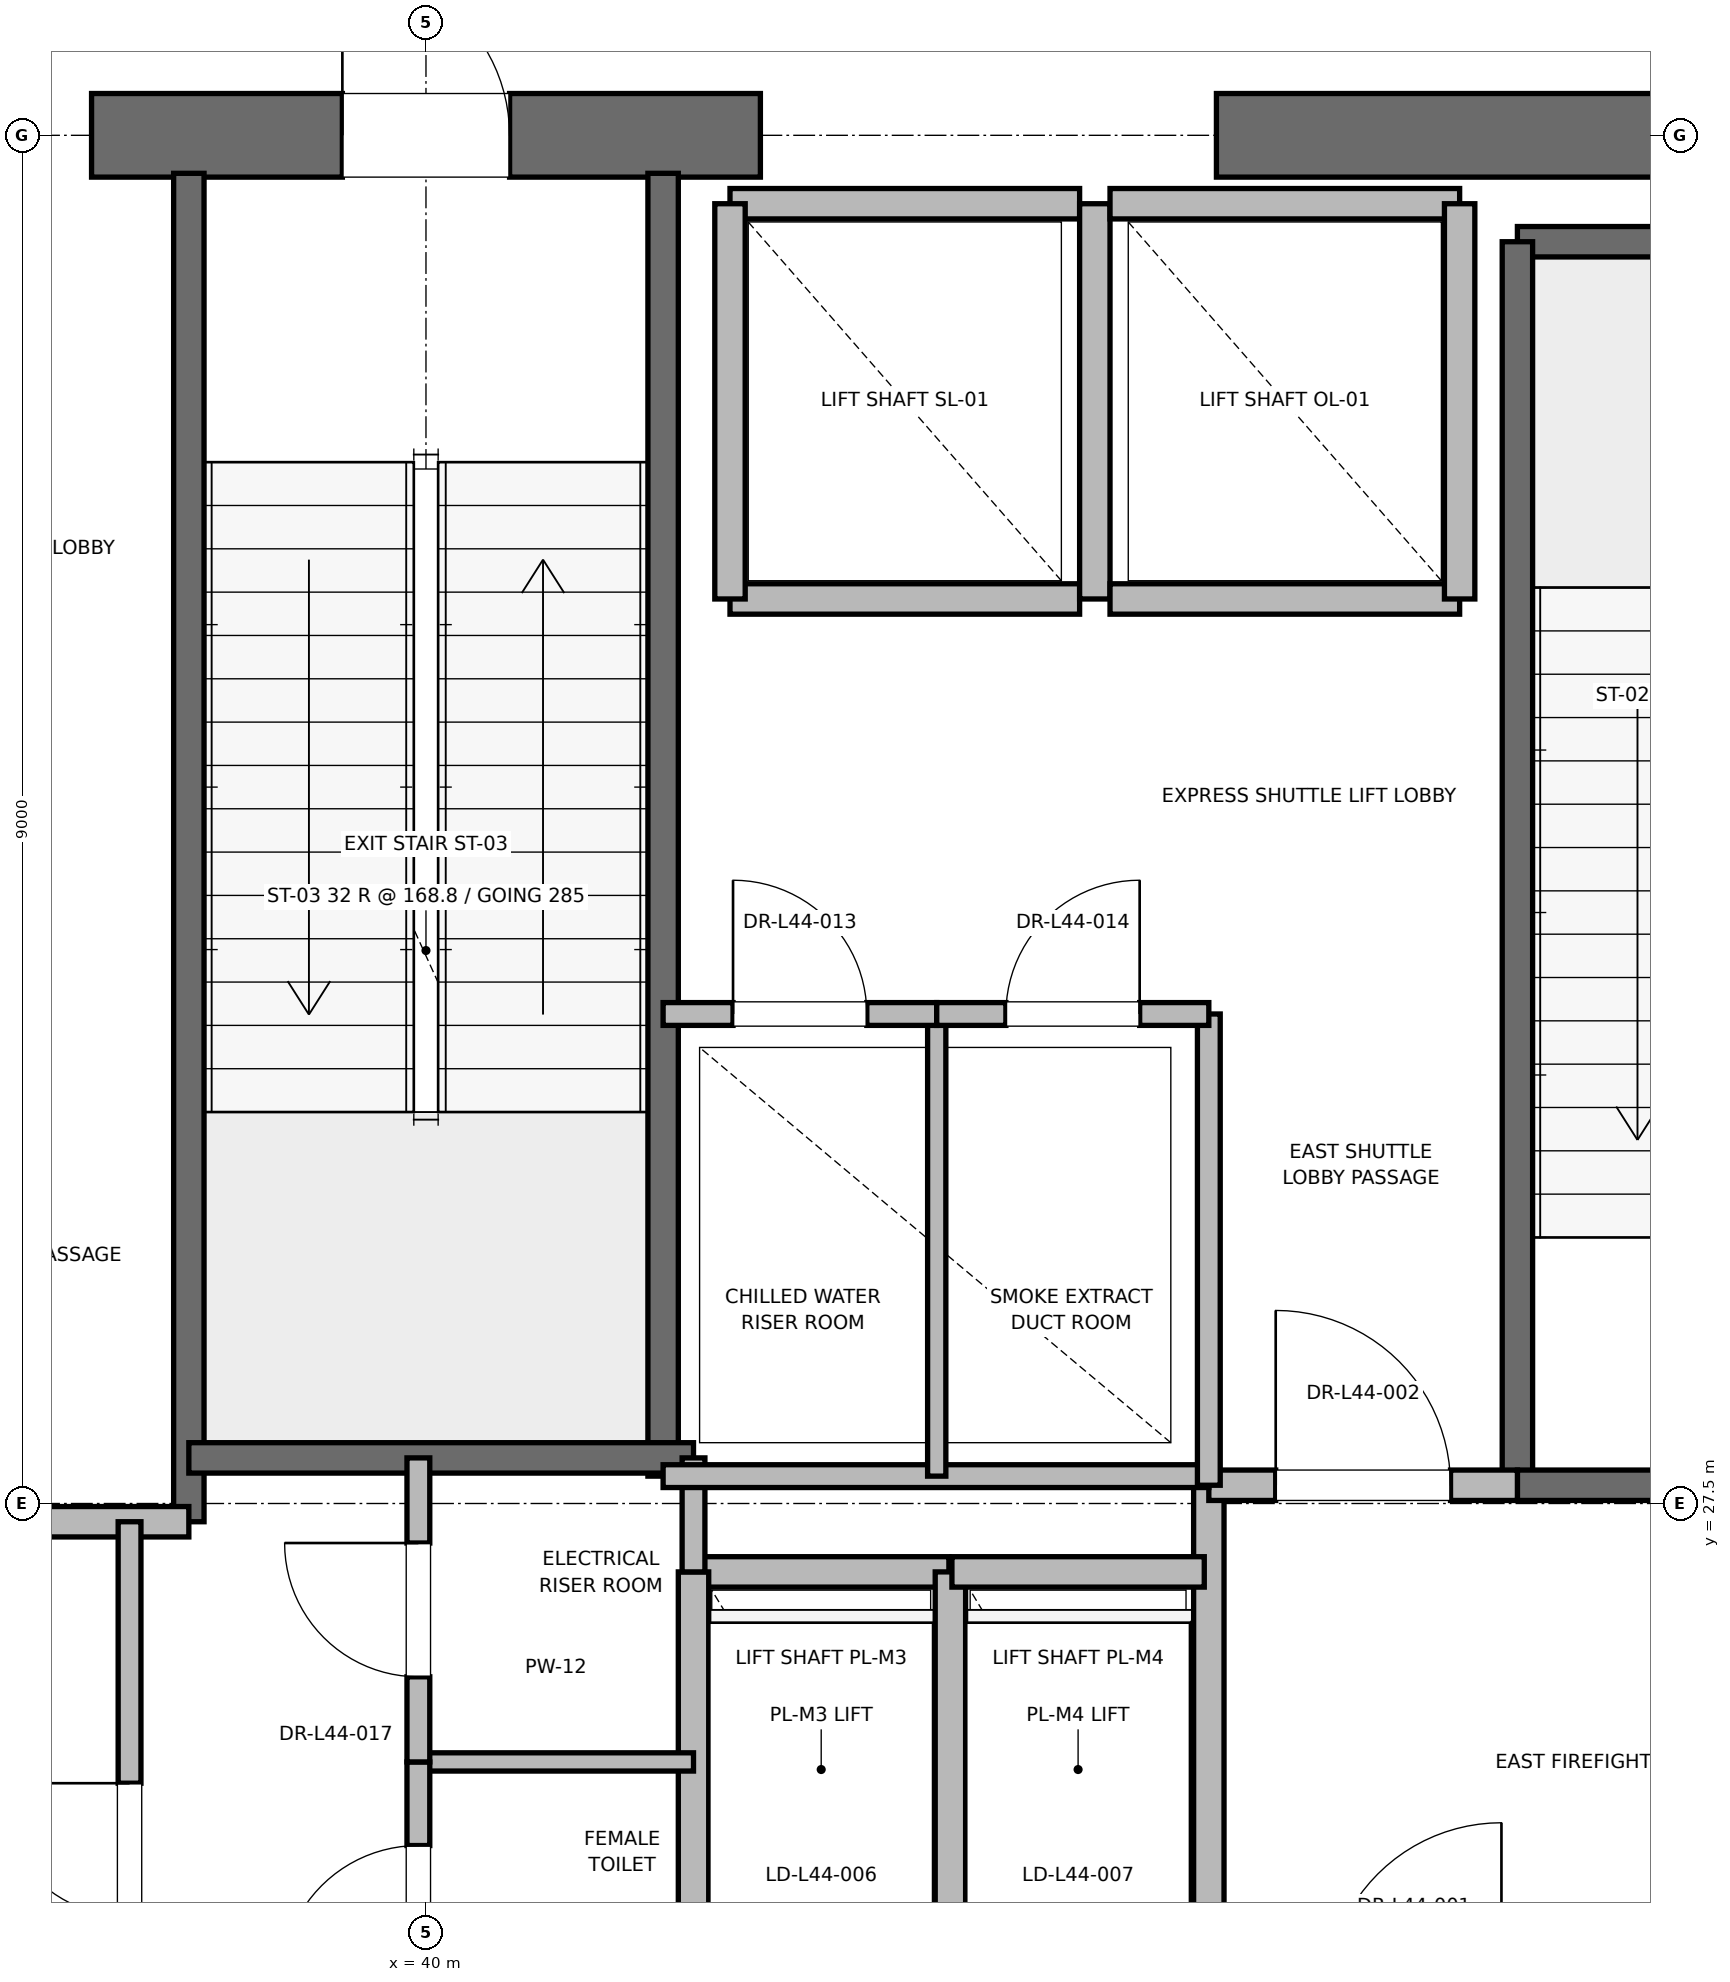
"""IFC4 building model, lengths in metres.
Left out: names, types, materials, properties, quantities, classifications, styles, units other than length and angle.
Written with IfcOpenShell. Run it as: python <this file> out.ifc"""

import sys

from ifc_helpers import new_model, si_unit, direction, frame, frame_2d, origin, place, context, subcontext, project, spatial, rectangle, extrude, element, fill, save


model = new_model("IFC4")
c1 = context("Model", 3, precision=1e-05, world=origin(), true_north=direction((0.0, 1.0)))
c2 = subcontext(c1, "Body", "Model", "MODEL_VIEW")
j1 = project(units=[si_unit("LENGTHUNIT", "METRE"), si_unit("PLANEANGLEUNIT", "RADIAN")], contexts=[c1])
p1 = place(None, origin())
s1 = spatial("IfcSite", under=j1, at=p1, CompositionType="ELEMENT")
p2 = place(p1, origin())
s2 = spatial("IfcBuilding", under=s1, at=p2, CompositionType="ELEMENT")
p3 = place(p2, frame((0.0, 0.0, 189.4)))
s3 = spatial("IfcBuildingStorey", under=s2, at=p3, CompositionType="ELEMENT", Elevation=189.4)
p4 = place(p3, frame((37.8, 36.5, 0.0), z_axis=(0.0, 0.0, 1.0), x_axis=(1.0, 0.0, 0.0)))
e1 = element("IfcWall", 1, at=p4, inside=s3, PredefinedType="SHEAR", context=c2, shape_type="SweptSolid", body=[
    extrude(rectangle(XDim=4.4, YDim=0.55, at=frame_2d((2.2, 0.0))), origin(), (0.0, 0.0, 1.0), 5.1),
])
p5 = place(p4, frame((1.65, 0.0, 0.0)))
e2 = element("IfcOpeningElement", 2, at=p5, cuts=e1, PredefinedType="OPENING", context=c2, shape_type="SweptSolid", body=[
    extrude(rectangle(XDim=1.1, YDim=2.15, at=frame_2d((0.55, 1.075))), frame((0.0, 0.275, 0.0), z_axis=(0.0, -1.0, 0.0), x_axis=(1.0, 0.0, 0.0)), (0.0, 0.0, 1.0), 0.55),
])
p6 = place(p3, frame((45.2, 36.5, 0.0), z_axis=(0.0, 0.0, 1.0), x_axis=(1.0, 0.0, 0.0)))
e3 = element("IfcWall", 3, at=p6, inside=s3, PredefinedType="SHEAR", context=c2, shape_type="SweptSolid", body=[
    extrude(rectangle(XDim=5.8, YDim=0.55, at=frame_2d((2.9, 0.0))), origin(), (0.0, 0.0, 1.0), 5.1),
])
p7 = place(p3, frame((47.18, 35.8, 0.0), z_axis=(0.0, 0.0, 1.0), x_axis=(1.0, 0.0, 0.0)))
e4 = element("IfcWall", 4, at=p7, inside=s3, PredefinedType="SOLIDWALL", context=c2, shape_type="SweptSolid", body=[
    extrude(rectangle(XDim=3.12, YDim=0.2, at=frame_2d((1.56, 0.0))), origin(), (0.0, 0.0, 1.0), 5.1),
])
p8 = place(p3, frame((47.18, 27.62, 0.0), z_axis=(0.0, 0.0, 1.0), x_axis=(0.0, 1.0, 0.0)))
e5 = element("IfcWall", 5, at=p8, inside=s3, PredefinedType="SOLIDWALL", context=c2, shape_type="SweptSolid", body=[
    extrude(rectangle(XDim=8.18, YDim=0.2, at=frame_2d((4.09, 0.0))), origin(), (0.0, 0.0, 1.0), 5.1),
])
p9 = place(p3, frame((47.18, 27.62, 0.0), z_axis=(0.0, 0.0, 1.0), x_axis=(1.0, 0.0, 0.0)))
e6 = element("IfcWall", 6, at=p9, inside=s3, PredefinedType="SOLIDWALL", context=c2, shape_type="SweptSolid", body=[
    extrude(rectangle(XDim=3.12, YDim=0.2, at=frame_2d((1.56, 0.0))), origin(), (0.0, 0.0, 1.0), 5.1),
])
p10 = place(p9, frame((1.01, 0.0, 0.0)))
e7 = element("IfcOpeningElement", 7, at=p10, cuts=e6, PredefinedType="OPENING", context=c2, shape_type="SweptSolid", body=[
    extrude(rectangle(XDim=1.1, YDim=2.15, at=frame_2d((0.55, 1.075))), frame((0.0, 0.1, 0.0), z_axis=(0.0, -1.0, 0.0), x_axis=(1.0, 0.0, 0.0)), (0.0, 0.0, 1.0), 0.2),
])
p11 = place(p3, frame((38.44, 27.38, 0.0), z_axis=(0.0, 0.0, 1.0), x_axis=(0.0, 1.0, 0.0)))
e8 = element("IfcWall", 8, at=p11, inside=s3, PredefinedType="SOLIDWALL", context=c2, shape_type="SweptSolid", body=[
    extrude(rectangle(XDim=8.87, YDim=0.2, at=frame_2d((4.435, 0.0))), origin(), (0.0, 0.0, 1.0), 5.1),
])
p12 = place(p3, frame((41.56, 27.68, 0.0), z_axis=(0.0, 0.0, 1.0), x_axis=(0.0, 1.0, 0.0)))
e9 = element("IfcWall", 9, at=p12, inside=s3, PredefinedType="SOLIDWALL", context=c2, shape_type="SweptSolid", body=[
    extrude(rectangle(XDim=8.57, YDim=0.2, at=frame_2d((4.285, 0.0))), origin(), (0.0, 0.0, 1.0), 5.1),
])
p13 = place(p3, frame((38.44, 27.8, 0.0), z_axis=(0.0, 0.0, 1.0), x_axis=(1.0, 0.0, 0.0)))
e10 = element("IfcWall", 10, at=p13, inside=s3, PredefinedType="SOLIDWALL", context=c2, shape_type="SweptSolid", body=[
    extrude(rectangle(XDim=3.32, YDim=0.2, at=frame_2d((1.66, 0.0))), origin(), (0.0, 0.0, 1.0), 5.1),
])
p14 = place(p3, frame((32.82, 27.38, 0.0), z_axis=(0.0, 0.0, 1.0), x_axis=(1.0, 0.0, 0.0)))
e11 = element("IfcWall", 11, at=p14, inside=s3, PredefinedType="PARTITIONING", context=c2, shape_type="SweptSolid", body=[
    extrude(rectangle(XDim=5.62, YDim=0.2, at=frame_2d((2.81, 0.0))), origin(), (0.0, 0.0, 1.0), 5.1),
])
p15 = place(p3, frame((45.15, 24.25, 0.0), z_axis=(0.0, 0.0, 1.0), x_axis=(0.0, 1.0, 0.0)))
e12 = element("IfcWall", 12, at=p15, inside=s3, PredefinedType="PARTITIONING", context=c2, shape_type="SweptSolid", body=[
    extrude(rectangle(XDim=3.37, YDim=0.2, at=frame_2d((1.685, 0.0))), origin(), (0.0, 0.0, 1.0), 5.1),
])
p16 = place(p3, frame((45.15, 27.62, 0.0), z_axis=(0.0, 0.0, 1.0), x_axis=(1.0, 0.0, 0.0)))
e13 = element("IfcWall", 13, at=p16, inside=s3, PredefinedType="PARTITIONING", context=c2, shape_type="SweptSolid", body=[
    extrude(rectangle(XDim=2.03, YDim=0.2, at=frame_2d((1.015, 0.0))), origin(), (0.0, 0.0, 1.0), 5.1),
])
p17 = place(p16, frame((0.44, 0.0, 0.0)))
e14 = element("IfcOpeningElement", 14, at=p17, cuts=e13, PredefinedType="OPENING", context=c2, shape_type="SweptSolid", body=[
    extrude(rectangle(XDim=1.15, YDim=2.2, at=frame_2d((0.575, 1.1))), frame((0.0, 0.1, 0.0), z_axis=(0.0, -1.0, 0.0), x_axis=(1.0, 0.0, 0.0)), (0.0, 0.0, 1.0), 0.2),
])
p18 = place(p3, frame((43.44, 27.05, 0.0), z_axis=(0.0, 0.0, 1.0), x_axis=(-1.0, 0.0, 0.0)))
e15 = element("IfcWall", 15, at=p18, inside=s3, PredefinedType="SOLIDWALL", context=c2, shape_type="SweptSolid", body=[
    extrude(rectangle(XDim=1.68, YDim=0.2, at=frame_2d((0.84, 0.0))), origin(), (0.0, 0.0, 1.0), 5.1),
])
for number, where, z_axis, x_axis in (
    (16, (41.76, 27.05, 0.0), (0.0, 0.0, 1.0), (0.0, -1.0, 0.0)),
    (17, (43.45, 24.45, 0.0), (0.0, 0.0, 1.0), (0.0, 1.0, 0.0)),
):
    element("IfcWall", number, at=place(p3, frame(where, z_axis=z_axis, x_axis=x_axis)), inside=s3, PredefinedType="SOLIDWALL", context=c2, shape_type="SweptSolid", body=[
        extrude(rectangle(XDim=2.6, YDim=0.2, at=frame_2d((1.3, 0.0))), origin(), (0.0, 0.0, 1.0), 5.1),
    ])
p19 = place(p3, frame((45.12, 27.05, 0.0), z_axis=(0.0, 0.0, 1.0), x_axis=(-1.0, 0.0, 0.0)))
e18 = element("IfcWall", 18, at=p19, inside=s3, PredefinedType="SOLIDWALL", context=c2, shape_type="SweptSolid", body=[
    extrude(rectangle(XDim=1.66, YDim=0.2, at=frame_2d((0.83, 0.0))), origin(), (0.0, 0.0, 1.0), 5.1),
])
p20 = place(p3, frame((42.0, 33.45, 0.0), z_axis=(0.0, 0.0, 1.0), x_axis=(1.0, 0.0, 0.0)))
e19 = element("IfcWall", 19, at=p20, inside=s3, PredefinedType="SOLIDWALL", context=c2, shape_type="SweptSolid", body=[
    extrude(rectangle(XDim=2.3, YDim=0.2, at=frame_2d((1.15, 0.0))), origin(), (0.0, 0.0, 1.0), 5.1),
])
p21 = place(p3, frame((44.3, 36.05, 0.0), z_axis=(0.0, 0.0, 1.0), x_axis=(-1.0, 0.0, 0.0)))
e20 = element("IfcWall", 20, at=p21, inside=s3, PredefinedType="SOLIDWALL", context=c2, shape_type="SweptSolid", body=[
    extrude(rectangle(XDim=2.3, YDim=0.2, at=frame_2d((1.15, 0.0))), origin(), (0.0, 0.0, 1.0), 4.08),
])
for number, where, z_axis, x_axis in (
    (21, (42.0, 36.05, 0.0), (0.0, 0.0, 1.0), (0.0, -1.0, 0.0)),
    (22, (44.4, 33.45, 0.0), (0.0, 0.0, 1.0), (0.0, 1.0, 0.0)),
):
    element("IfcWall", number, at=place(p3, frame(where, z_axis=z_axis, x_axis=x_axis)), inside=s3, PredefinedType="SOLIDWALL", context=c2, shape_type="SweptSolid", body=[
        extrude(rectangle(XDim=2.6, YDim=0.2, at=frame_2d((1.3, 0.0))), origin(), (0.0, 0.0, 1.0), 4.08),
    ])
p22 = place(p3, frame((44.5, 33.45, 0.0), z_axis=(0.0, 0.0, 1.0), x_axis=(1.0, 0.0, 0.0)))
e23 = element("IfcWall", 23, at=p22, inside=s3, PredefinedType="SOLIDWALL", context=c2, shape_type="SweptSolid", body=[
    extrude(rectangle(XDim=2.3, YDim=0.2, at=frame_2d((1.15, 0.0))), origin(), (0.0, 0.0, 1.0), 5.1),
])
p23 = place(p3, frame((46.8, 36.05, 0.0), z_axis=(0.0, 0.0, 1.0), x_axis=(-1.0, 0.0, 0.0)))
e24 = element("IfcWall", 24, at=p23, inside=s3, PredefinedType="SOLIDWALL", context=c2, shape_type="SweptSolid", body=[
    extrude(rectangle(XDim=2.3, YDim=0.2, at=frame_2d((1.15, 0.0))), origin(), (0.0, 0.0, 1.0), 4.08),
])
p24 = place(p3, frame((46.8, 33.45, 0.0), z_axis=(0.0, 0.0, 1.0), x_axis=(0.0, 1.0, 0.0)))
e25 = element("IfcWall", 25, at=p24, inside=s3, PredefinedType="SOLIDWALL", context=c2, shape_type="SweptSolid", body=[
    extrude(rectangle(XDim=2.6, YDim=0.2, at=frame_2d((1.3, 0.0))), origin(), (0.0, 0.0, 1.0), 5.1),
])
p25 = place(p3, frame((39.95, 25.8, 0.0), z_axis=(0.0, 0.0, 1.0), x_axis=(1.0, 0.0, 0.0)))
e26 = element("IfcWall", 26, at=p25, inside=s3, PredefinedType="PARTITIONING", context=c2, shape_type="SweptSolid", body=[
    extrude(rectangle(XDim=1.81, YDim=0.12, at=frame_2d((0.905, 0.0))), origin(), (0.0, 0.0, 1.0), 2.85),
])
p26 = place(p3, frame((41.76, 27.05, 0.0), z_axis=(0.0, 0.0, 1.0), x_axis=(0.0, 1.0, 0.0)))
e27 = element("IfcWall", 27, at=p26, inside=s3, PredefinedType="PARTITIONING", context=c2, shape_type="SweptSolid", body=[
    extrude(rectangle(XDim=0.75, YDim=0.15, at=frame_2d((0.375, 0.0))), origin(), (0.0, 0.0, 1.0), 2.85),
])
p27 = place(p3, frame((39.95, 23.8, 0.0), z_axis=(0.0, 0.0, 1.0), x_axis=(0.0, 1.0, 0.0)))
e28 = element("IfcWall", 28, at=p27, inside=s3, PredefinedType="PARTITIONING", context=c2, shape_type="SweptSolid", body=[
    extrude(rectangle(XDim=2.0, YDim=0.15, at=frame_2d((1.0, 0.0))), origin(), (0.0, 0.0, 1.0), 2.85),
])
p28 = place(p27, frame((0.55, 0.0, 0.0)))
e29 = element("IfcOpeningElement", 29, at=p28, cuts=e28, PredefinedType="OPENING", context=c2, shape_type="SweptSolid", body=[
    extrude(rectangle(XDim=0.9, YDim=2.1, at=frame_2d((0.45, 1.05))), frame((0.0, 0.075, 0.0), z_axis=(0.0, -1.0, 0.0), x_axis=(1.0, 0.0, 0.0)), (0.0, 0.0, 1.0), 0.15),
])
p29 = place(p3, frame((39.95, 25.8, 0.0), z_axis=(0.0, 0.0, 1.0), x_axis=(0.0, 1.0, 0.0)))
e30 = element("IfcWall", 30, at=p29, inside=s3, PredefinedType="PARTITIONING", context=c2, shape_type="SweptSolid", body=[
    extrude(rectangle(XDim=2.0, YDim=0.15, at=frame_2d((1.0, 0.0))), origin(), (0.0, 0.0, 1.0), 2.85),
])
p30 = place(p29, frame((0.56, 0.0, 0.0)))
e31 = element("IfcOpeningElement", 31, at=p30, cuts=e30, PredefinedType="OPENING", context=c2, shape_type="SweptSolid", body=[
    extrude(rectangle(XDim=0.88, YDim=2.1, at=frame_2d((0.44, 1.05))), frame((0.0, 0.075, 0.0), z_axis=(0.0, -1.0, 0.0), x_axis=(1.0, 0.0, 0.0)), (0.0, 0.0, 1.0), 0.15),
])
p31 = place(p3, frame((38.05, 23.06, 0.0), z_axis=(0.0, 0.0, 1.0), x_axis=(0.0, 1.0, 0.0)))
e32 = element("IfcWall", 32, at=p31, inside=s3, PredefinedType="PARTITIONING", context=c2, shape_type="SweptSolid", body=[
    extrude(rectangle(XDim=4.32, YDim=0.15, at=frame_2d((2.16, 0.0))), origin(), (0.0, 0.0, 1.0), 2.85),
])
p32 = place(p31, frame((1.72, 0.0, 0.0)))
e33 = element("IfcOpeningElement", 33, at=p32, cuts=e32, PredefinedType="OPENING", context=c2, shape_type="SweptSolid", body=[
    extrude(rectangle(XDim=0.88, YDim=2.1, at=frame_2d((0.44, 1.05))), frame((0.0, 0.075, 0.0), z_axis=(0.0, -1.0, 0.0), x_axis=(1.0, 0.0, 0.0)), (0.0, 0.0, 1.0), 0.15),
])
p33 = place(p3, frame((41.56, 27.68, 0.0), z_axis=(0.0, 0.0, 1.0), x_axis=(1.0, 0.0, 0.0)))
e34 = element("IfcWall", 34, at=p33, inside=s3, PredefinedType="PARTITIONING", context=c2, shape_type="SweptSolid", body=[
    extrude(rectangle(XDim=3.59, YDim=0.15, at=frame_2d((1.795, 0.0))), origin(), (0.0, 0.0, 1.0), 2.85),
])
p34 = place(p3, frame((45.15, 27.62, 0.0), z_axis=(0.0, 0.0, 1.0), x_axis=(0.0, 1.0, 0.0)))
e35 = element("IfcWall", 35, at=p34, inside=s3, PredefinedType="PARTITIONING", context=c2, shape_type="SweptSolid", body=[
    extrude(rectangle(XDim=3.1, YDim=0.15, at=frame_2d((1.55, 0.0))), origin(), (0.0, 0.0, 1.0), 2.85),
])
p35 = place(p3, frame((43.36, 27.68, 0.0), z_axis=(0.0, 0.0, 1.0), x_axis=(0.0, 1.0, 0.0)))
e36 = element("IfcWall", 36, at=p35, inside=s3, PredefinedType="PARTITIONING", context=c2, shape_type="SweptSolid", body=[
    extrude(rectangle(XDim=3.04, YDim=0.12, at=frame_2d((1.52, 0.0))), origin(), (0.0, 0.0, 1.0), 2.85),
])
p36 = place(p3, frame((41.56, 30.72, 0.0), z_axis=(0.0, 0.0, 1.0), x_axis=(1.0, 0.0, 0.0)))
e37 = element("IfcWall", 37, at=p36, inside=s3, PredefinedType="PARTITIONING", context=c2, shape_type="SweptSolid", body=[
    extrude(rectangle(XDim=1.8, YDim=0.15, at=frame_2d((0.9, 0.0))), origin(), (0.0, 0.0, 1.0), 2.85),
])
p37 = place(p36, frame((0.46, 0.0, 0.0)))
e38 = element("IfcOpeningElement", 38, at=p37, cuts=e37, PredefinedType="OPENING", context=c2, shape_type="SweptSolid", body=[
    extrude(rectangle(XDim=0.88, YDim=2.1, at=frame_2d((0.44, 1.05))), frame((0.0, 0.075, 0.0), z_axis=(0.0, -1.0, 0.0), x_axis=(1.0, 0.0, 0.0)), (0.0, 0.0, 1.0), 0.15),
])
p38 = place(p3, frame((43.36, 30.72, 0.0), z_axis=(0.0, 0.0, 1.0), x_axis=(1.0, 0.0, 0.0)))
e39 = element("IfcWall", 39, at=p38, inside=s3, PredefinedType="PARTITIONING", context=c2, shape_type="SweptSolid", body=[
    extrude(rectangle(XDim=1.79, YDim=0.15, at=frame_2d((0.895, 0.0))), origin(), (0.0, 0.0, 1.0), 2.85),
])
p39 = place(p38, frame((0.455, 0.0, 0.0)))
e40 = element("IfcOpeningElement", 40, at=p39, cuts=e39, PredefinedType="OPENING", context=c2, shape_type="SweptSolid", body=[
    extrude(rectangle(XDim=0.88, YDim=2.1, at=frame_2d((0.44, 1.05))), frame((0.0, 0.075, 0.0), z_axis=(0.0, -1.0, 0.0), x_axis=(1.0, 0.0, 0.0)), (0.0, 0.0, 1.0), 0.15),
])
p40 = place(p5, origin())
e41 = element("IfcDoor", 41, at=p40, inside=s3, OperationType="SINGLE_SWING_LEFT", PredefinedType="DOOR", context=c2, shape_type="SweptSolid", body=[
    extrude(rectangle(XDim=1.1, YDim=2.15, at=frame_2d((0.55, 1.075))), frame((0.0, 0.025, 0.0), z_axis=(0.0, -1.0, 0.0), x_axis=(1.0, 0.0, 0.0)), (0.0, 0.0, 1.0), 0.05),
])
fill(e2, e41)
p41 = place(p17, origin())
e42 = element("IfcDoor", 42, at=p41, inside=s3, OperationType="SINGLE_SWING_LEFT", PredefinedType="DOOR", context=c2, shape_type="SweptSolid", body=[
    extrude(rectangle(XDim=1.15, YDim=2.2, at=frame_2d((0.575, 1.1))), frame((0.0, 0.025, 0.0), z_axis=(0.0, -1.0, 0.0), x_axis=(1.0, 0.0, 0.0)), (0.0, 0.0, 1.0), 0.05),
])
fill(e14, e42)
p42 = place(p28, origin())
e43 = element("IfcDoor", 43, at=p42, inside=s3, OperationType="SINGLE_SWING_LEFT", PredefinedType="DOOR", context=c2, shape_type="SweptSolid", body=[
    extrude(rectangle(XDim=0.9, YDim=2.1, at=frame_2d((0.45, 1.05))), frame((0.0, 0.025, 0.0), z_axis=(0.0, -1.0, 0.0), x_axis=(1.0, 0.0, 0.0)), (0.0, 0.0, 1.0), 0.05),
])
fill(e29, e43)
p43 = place(p30, origin())
e44 = element("IfcDoor", 44, at=p43, inside=s3, OperationType="SINGLE_SWING_RIGHT", PredefinedType="DOOR", context=c2, shape_type="SweptSolid", body=[
    extrude(rectangle(XDim=0.88, YDim=2.1, at=frame_2d((0.44, 1.05))), frame((0.0, 0.025, 0.0), z_axis=(0.0, -1.0, 0.0), x_axis=(1.0, 0.0, 0.0)), (0.0, 0.0, 1.0), 0.05),
])
fill(e31, e44)
p44 = place(p32, origin())
e45 = element("IfcDoor", 45, at=p44, inside=s3, OperationType="SINGLE_SWING_RIGHT", PredefinedType="DOOR", context=c2, shape_type="SweptSolid", body=[
    extrude(rectangle(XDim=0.88, YDim=2.1, at=frame_2d((0.44, 1.05))), frame((0.0, 0.025, 0.0), z_axis=(0.0, -1.0, 0.0), x_axis=(1.0, 0.0, 0.0)), (0.0, 0.0, 1.0), 0.05),
])
fill(e33, e45)
p45 = place(p37, origin())
e46 = element("IfcDoor", 46, at=p45, inside=s3, OperationType="SINGLE_SWING_LEFT", PredefinedType="DOOR", context=c2, shape_type="SweptSolid", body=[
    extrude(rectangle(XDim=0.88, YDim=2.1, at=frame_2d((0.44, 1.05))), frame((0.0, 0.025, 0.0), z_axis=(0.0, -1.0, 0.0), x_axis=(1.0, 0.0, 0.0)), (0.0, 0.0, 1.0), 0.05),
])
fill(e38, e46)
p46 = place(p39, origin())
e47 = element("IfcDoor", 47, at=p46, inside=s3, OperationType="SINGLE_SWING_RIGHT", PredefinedType="DOOR", context=c2, shape_type="SweptSolid", body=[
    extrude(rectangle(XDim=0.88, YDim=2.1, at=frame_2d((0.44, 1.05))), frame((0.0, 0.025, 0.0), z_axis=(0.0, -1.0, 0.0), x_axis=(1.0, 0.0, 0.0)), (0.0, 0.0, 1.0), 0.05),
])
fill(e40, e47)
save(model, sys.argv[1])
